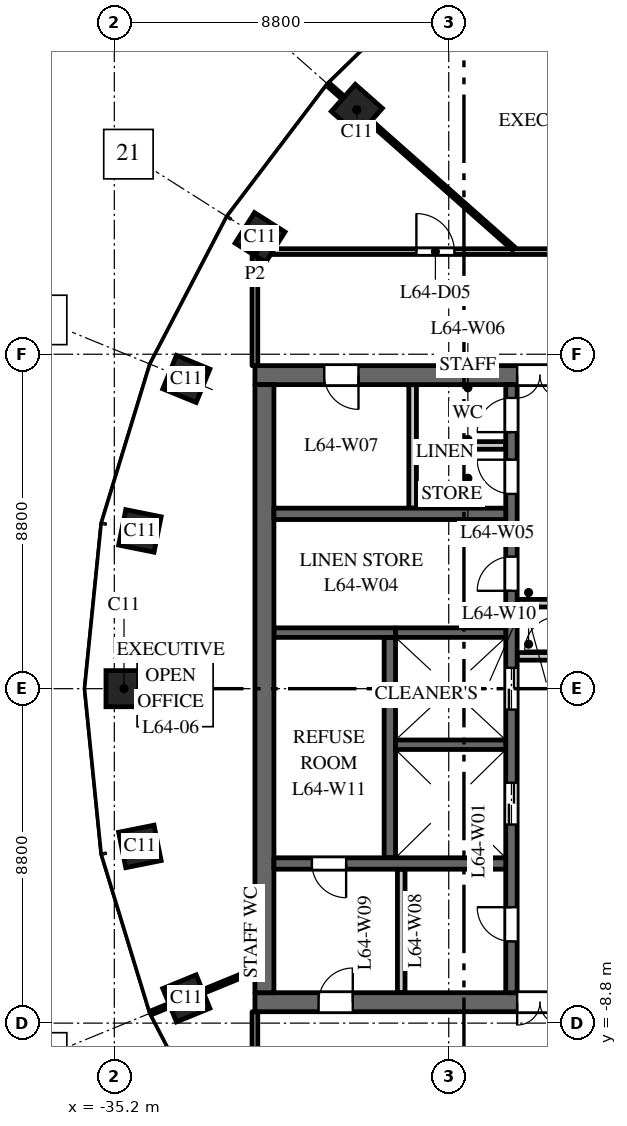
"""IFC4 building model, lengths in metres.
Left out: names, types, materials, properties, quantities, classifications, styles, units other than length and angle.
Written with IfcOpenShell. Run it as: python <this file> out.ifc"""

import sys

from ifc_helpers import new_model, si_unit, direction, frame, frame_2d, origin, origin_2d, place, context, subcontext, project, spatial, rectangle, extrude, element, fill, save


model = new_model("IFC4")
c1 = context("Model", 3, precision=1e-05, world=origin(), true_north=direction((0.0, 1.0)))
c2 = subcontext(c1, "Body", "Model", "MODEL_VIEW")
j1 = project(units=[si_unit("LENGTHUNIT", "METRE"), si_unit("PLANEANGLEUNIT", "RADIAN")], contexts=[c1])
p1 = place(None, origin())
s1 = spatial("IfcSite", under=j1, at=p1, CompositionType="ELEMENT")
p2 = place(p1, origin())
s2 = spatial("IfcBuilding", under=s1, at=p2, CompositionType="ELEMENT")
p3 = place(p2, frame((0.0, 0.0, 299.0)))
s3 = spatial("IfcBuildingStorey", under=s2, at=p3, CompositionType="ELEMENT", Elevation=299.0)
for number, where, z_axis, x_axis in (
    (1, (-28.819, 15.23, 0.0), (0.0, 0.0, 1.0), (-0.663, -0.749, 0.0)),
    (2, (-31.365, 11.871, 0.0), (0.0, 0.0, 1.0), (-0.535, -0.845, 0.0)),
    (3, (-33.305, 8.149, 0.0), (0.0, 0.0, 1.0), (-0.379, -0.925, 0.0)),
    (4, (-34.527, 4.151, 0.0), (0.0, 0.0, 1.0), (-0.197, -0.98, 0.0)),
    (5, (-34.945, 0.0, 0.0), (0.0, 0.0, 1.0), (0.0, -1.0, 0.0)),
    (6, (-34.527, -4.151, 0.0), (0.0, 0.0, 1.0), (0.197, -0.98, 0.0)),
    (7, (-33.305, -8.149, 0.0), (0.0, 0.0, 1.0), (0.379, -0.925, 0.0)),
):
    element("IfcColumn", number, at=place(p3, frame(where, z_axis=z_axis, x_axis=x_axis)), inside=s3, PredefinedType="COLUMN", context=c2, shape_type="SweptSolid", body=[
        extrude(rectangle(XDim=0.95, YDim=0.95, at=origin_2d()), origin(), (0.0, 0.0, 1.0), 4.0),
    ])
p4 = place(p3, frame((-16.5, 8.25, 0.0), z_axis=(0.0, 0.0, 1.0), x_axis=(-1.0, 0.0, 0.0)))
e8 = element("IfcWall", 8, at=p4, inside=s3, PredefinedType="SHEAR", context=c2, shape_type="SweptSolid", body=[
    extrude(rectangle(XDim=15.0, YDim=0.5, at=frame_2d((7.5, 0.0))), origin(), (0.0, 0.0, 1.0), 3.7),
])
p5 = place(p4, frame((6.9, 0.0, 0.0)))
e9 = element("IfcOpeningElement", 9, at=p5, cuts=e8, PredefinedType="OPENING", context=c2, shape_type="SweptSolid", body=[
    extrude(rectangle(XDim=1.2, YDim=2.1, at=frame_2d((0.6, 1.05))), frame((0.0, 0.26, 0.0), z_axis=(0.0, -1.0, 0.0), x_axis=(1.0, 0.0, 0.0)), (0.0, 0.0, 1.0), 0.52),
])
p6 = place(p4, frame((12.275, 0.0, 0.0)))
e10 = element("IfcOpeningElement", 10, at=p6, cuts=e8, PredefinedType="OPENING", context=c2, shape_type="SweptSolid", body=[
    extrude(rectangle(XDim=0.9, YDim=2.1, at=frame_2d((0.45, 1.05))), frame((0.0, 0.26, 0.0), z_axis=(0.0, -1.0, 0.0), x_axis=(1.0, 0.0, 0.0)), (0.0, 0.0, 1.0), 0.52),
])
p7 = place(p3, frame((-16.5, -8.25, 0.0), z_axis=(0.0, 0.0, 1.0), x_axis=(-1.0, 0.0, 0.0)))
e11 = element("IfcWall", 11, at=p7, inside=s3, PredefinedType="SHEAR", context=c2, shape_type="SweptSolid", body=[
    extrude(rectangle(XDim=15.0, YDim=0.5, at=frame_2d((7.5, 0.0))), origin(), (0.0, 0.0, 1.0), 3.7),
])
p8 = place(p7, frame((6.9, 0.0, 0.0)))
e12 = element("IfcOpeningElement", 12, at=p8, cuts=e11, PredefinedType="OPENING", context=c2, shape_type="SweptSolid", body=[
    extrude(rectangle(XDim=1.2, YDim=2.1, at=frame_2d((0.6, 1.05))), frame((0.0, 0.26, 0.0), z_axis=(0.0, -1.0, 0.0), x_axis=(1.0, 0.0, 0.0)), (0.0, 0.0, 1.0), 0.52),
])
p9 = place(p7, frame((12.425, 0.0, 0.0)))
e13 = element("IfcOpeningElement", 13, at=p9, cuts=e11, PredefinedType="OPENING", context=c2, shape_type="SweptSolid", body=[
    extrude(rectangle(XDim=0.9, YDim=2.1, at=frame_2d((0.45, 1.05))), frame((0.0, 0.26, 0.0), z_axis=(0.0, -1.0, 0.0), x_axis=(1.0, 0.0, 0.0)), (0.0, 0.0, 1.0), 0.52),
])
p10 = place(p3, frame((-27.95, -4.45, 0.0), z_axis=(0.0, 0.0, 1.0), x_axis=(0.0, 1.0, 0.0)))
e14 = element("IfcWall", 14, at=p10, inside=s3, PredefinedType="SHEAR", context=c2, shape_type="SweptSolid", body=[
    extrude(rectangle(XDim=5.8, YDim=0.3, at=frame_2d((2.9, 0.0))), origin(), (0.0, 0.0, 1.0), 3.7),
])
p11 = place(p3, frame((-27.8, 1.475, 0.0), z_axis=(0.0, 0.0, 1.0), x_axis=(-1.0, 0.0, 0.0)))
e15 = element("IfcWall", 15, at=p11, inside=s3, PredefinedType="SHEAR", context=c2, shape_type="SweptSolid", body=[
    extrude(rectangle(XDim=3.2, YDim=0.25, at=frame_2d((1.6, 0.0))), origin(), (0.0, 0.0, 1.0), 3.7),
])
p12 = place(p3, frame((-24.75, -8.0, 0.0), z_axis=(0.0, 0.0, 1.0), x_axis=(0.0, 1.0, 0.0)))
e16 = element("IfcWall", 16, at=p12, inside=s3, PredefinedType="SHEAR", context=c2, shape_type="SweptSolid", body=[
    extrude(rectangle(XDim=16.0, YDim=0.3, at=frame_2d((8.0, 0.0))), origin(), (0.0, 0.0, 1.0), 3.7),
])
p13 = place(p12, frame((4.425, 0.0, 0.0)))
e17 = element("IfcOpeningElement", 17, at=p13, cuts=e16, PredefinedType="OPENING", context=c2, shape_type="SweptSolid", body=[
    extrude(rectangle(XDim=1.1, YDim=2.1, at=frame_2d((0.55, 1.05))), frame((0.0, 0.16, 0.0), z_axis=(0.0, -1.0, 0.0), x_axis=(1.0, 0.0, 0.0)), (0.0, 0.0, 1.0), 0.32),
])
p14 = place(p12, frame((7.45, 0.0, 0.0)))
e18 = element("IfcOpeningElement", 18, at=p14, cuts=e16, PredefinedType="OPENING", context=c2, shape_type="SweptSolid", body=[
    extrude(rectangle(XDim=1.1, YDim=2.1, at=frame_2d((0.55, 1.05))), frame((0.0, 0.16, 0.0), z_axis=(0.0, -1.0, 0.0), x_axis=(1.0, 0.0, 0.0)), (0.0, 0.0, 1.0), 0.32),
])
p15 = place(p12, frame((10.575, 0.0, 0.0)))
e19 = element("IfcOpeningElement", 19, at=p15, cuts=e16, PredefinedType="OPENING", context=c2, shape_type="SweptSolid", body=[
    extrude(rectangle(XDim=0.9, YDim=2.1, at=frame_2d((0.45, 1.05))), frame((0.0, 0.16, 0.0), z_axis=(0.0, -1.0, 0.0), x_axis=(1.0, 0.0, 0.0)), (0.0, 0.0, 1.0), 0.32),
])
p16 = place(p12, frame((13.125, 0.0, 0.0)))
e20 = element("IfcOpeningElement", 20, at=p16, cuts=e16, PredefinedType="OPENING", context=c2, shape_type="SweptSolid", body=[
    extrude(rectangle(XDim=0.9, YDim=2.1, at=frame_2d((0.45, 1.05))), frame((0.0, 0.16, 0.0), z_axis=(0.0, -1.0, 0.0), x_axis=(1.0, 0.0, 0.0)), (0.0, 0.0, 1.0), 0.32),
])
p17 = place(p12, frame((14.75, 0.0, 0.0)))
e21 = element("IfcOpeningElement", 21, at=p17, cuts=e16, PredefinedType="OPENING", context=c2, shape_type="SweptSolid", body=[
    extrude(rectangle(XDim=0.9, YDim=2.1, at=frame_2d((0.45, 1.05))), frame((0.0, 0.16, 0.0), z_axis=(0.0, -1.0, 0.0), x_axis=(1.0, 0.0, 0.0)), (0.0, 0.0, 1.0), 0.32),
])
p18 = place(p12, frame((1.35, 0.0, 0.0)))
e22 = element("IfcOpeningElement", 22, at=p18, cuts=e16, PredefinedType="OPENING", context=c2, shape_type="SweptSolid", body=[
    extrude(rectangle(XDim=0.9, YDim=2.1, at=frame_2d((0.45, 1.05))), frame((0.0, 0.16, 0.0), z_axis=(0.0, -1.0, 0.0), x_axis=(1.0, 0.0, 0.0)), (0.0, 0.0, 1.0), 0.32),
])
for number, where, z_axis, x_axis in (
    (23, (-23.4, 0.85, 0.0), (0.0, 0.0, 1.0), (-1.0, 0.0, 0.0)),
    (24, (-23.4, 2.25, 0.0), (0.0, 0.0, 1.0), (-1.0, 0.0, 0.0)),
):
    element("IfcWall", number, at=place(p3, frame(where, z_axis=z_axis, x_axis=x_axis)), inside=s3, PredefinedType="PARTITIONING", context=c2, shape_type="SweptSolid", body=[
        extrude(rectangle(XDim=1.2, YDim=0.2, at=frame_2d((0.6, 0.0))), origin(), (0.0, 0.0, 1.0), 3.7),
    ])
p19 = place(p3, frame((-31.25, -8.0, 0.0), z_axis=(0.0, 0.0, 1.0), x_axis=(0.0, 1.0, 0.0)))
e25 = element("IfcWall", 25, at=p19, inside=s3, PredefinedType="SHEAR", context=c2, shape_type="SweptSolid", body=[
    extrude(rectangle(XDim=16.0, YDim=0.5, at=frame_2d((8.0, 0.0))), origin(), (0.0, 0.0, 1.0), 3.7),
])
p20 = place(p3, frame((-24.9, 4.6, 0.0), z_axis=(0.0, 0.0, 1.0), x_axis=(-1.0, 0.0, 0.0)))
e26 = element("IfcWall", 26, at=p20, inside=s3, PredefinedType="SHEAR", context=c2, shape_type="SweptSolid", body=[
    extrude(rectangle(XDim=6.1, YDim=0.3, at=frame_2d((3.05, 0.0))), origin(), (0.0, 0.0, 1.0), 3.7),
])
for number, where, z_axis, x_axis in (
    (27, (-27.35, 4.75, 0.0), (0.0, 0.0, 1.0), (0.0, 1.0, 0.0)),
    (28, (-27.65, -8.0, 0.0), (0.0, 0.0, 1.0), (0.0, 1.0, 0.0)),
):
    element("IfcWall", number, at=place(p3, frame(where, z_axis=z_axis, x_axis=x_axis)), inside=s3, PredefinedType="PARTITIONING", context=c2, shape_type="SweptSolid", body=[
        extrude(rectangle(XDim=3.25, YDim=0.2, at=frame_2d((1.625, 0.0))), origin(), (0.0, 0.0, 1.0), 3.7),
    ])
p21 = place(p3, frame((-24.9, 6.4, 0.0), z_axis=(0.0, 0.0, 1.0), x_axis=(-1.0, 0.0, 0.0)))
e29 = element("IfcWall", 29, at=p21, inside=s3, PredefinedType="PARTITIONING", context=c2, shape_type="SweptSolid", body=[
    extrude(rectangle(XDim=2.35, YDim=0.2, at=frame_2d((1.175, 0.0))), origin(), (0.0, 0.0, 1.0), 3.7),
])
p22 = place(p3, frame((-24.9, -4.6, 0.0), z_axis=(0.0, 0.0, 1.0), x_axis=(-1.0, 0.0, 0.0)))
e30 = element("IfcWall", 30, at=p22, inside=s3, PredefinedType="SHEAR", context=c2, shape_type="SweptSolid", body=[
    extrude(rectangle(XDim=6.1, YDim=0.3, at=frame_2d((3.05, 0.0))), origin(), (0.0, 0.0, 1.0), 3.7),
])
p23 = place(p22, frame((4.2, 0.0, 0.0)))
e31 = element("IfcOpeningElement", 31, at=p23, cuts=e30, PredefinedType="OPENING", context=c2, shape_type="SweptSolid", body=[
    extrude(rectangle(XDim=0.9, YDim=2.1, at=frame_2d((0.45, 1.05))), frame((0.0, 0.16, 0.0), z_axis=(0.0, -1.0, 0.0), x_axis=(1.0, 0.0, 0.0)), (0.0, 0.0, 1.0), 0.32),
])
for number, where, z_axis, x_axis in (
    (32, (-24.9, -1.475, 0.0), (0.0, 0.0, 1.0), (-1.0, 0.0, 0.0)),
    (33, (-24.9, 1.475, 0.0), (0.0, 0.0, 1.0), (-1.0, 0.0, 0.0)),
):
    element("IfcWall", number, at=place(p3, frame(where, z_axis=z_axis, x_axis=x_axis)), inside=s3, PredefinedType="SHEAR", context=c2, shape_type="SweptSolid", body=[
        extrude(rectangle(XDim=2.9, YDim=0.25, at=frame_2d((1.45, 0.0))), origin(), (0.0, 0.0, 1.0), 3.7),
    ])
p24 = place(p3, frame((-34.234, -8.53, 0.0), z_axis=(0.0, 0.0, 1.0), x_axis=(0.925344112436, 0.379128307542, 0.0)))
e34 = element("IfcWall", 34, at=p24, inside=s3, PredefinedType="PARTITIONING", context=c2, shape_type="SweptSolid", body=[
    extrude(rectangle(XDim=2.954, YDim=0.1, at=frame_2d((1.477, 0.0))), origin(), (0.0, 0.0, 1.0), 3.0),
])
for number, where, z_axis, x_axis in (
    (35, (-31.5, -11.5, 0.0), (0.0, 0.0, 1.0), (0.0, 1.0, 0.0)),
    (36, (-31.5, 8.5, 0.0), (0.0, 0.0, 1.0), (0.0, 1.0, 0.0)),
):
    element("IfcWall", number, at=place(p3, frame(where, z_axis=z_axis, x_axis=x_axis)), inside=s3, PredefinedType="PARTITIONING", context=c2, shape_type="SweptSolid", body=[
        extrude(rectangle(XDim=3.0, YDim=0.15, at=frame_2d((1.5, 0.0))), origin(), (0.0, 0.0, 1.0), 3.0),
    ])
p25 = place(p3, frame((-31.5, 11.5, 0.0), z_axis=(0.0, 0.0, 1.0), x_axis=(1.0, 0.0, 0.0)))
e37 = element("IfcWall", 37, at=p25, inside=s3, PredefinedType="PARTITIONING", context=c2, shape_type="SweptSolid", body=[
    extrude(rectangle(XDim=29.768, YDim=0.15, at=frame_2d((14.884, 0.0))), origin(), (0.0, 0.0, 1.0), 2.75),
])
p26 = place(p25, frame((4.249, 0.0, 0.0)))
e38 = element("IfcOpeningElement", 38, at=p26, cuts=e37, PredefinedType="OPENING", context=c2, shape_type="SweptSolid", body=[
    extrude(rectangle(XDim=1.0, YDim=2.1, at=frame_2d((0.5, 1.05))), frame((0.0, 0.085, 0.0), z_axis=(0.0, -1.0, 0.0), x_axis=(1.0, 0.0, 0.0)), (0.0, 0.0, 1.0), 0.17),
])
p27 = place(p25, frame((16.471, 0.0, 0.0)))
e39 = element("IfcOpeningElement", 39, at=p27, cuts=e37, PredefinedType="OPENING", context=c2, shape_type="SweptSolid", body=[
    extrude(rectangle(XDim=1.0, YDim=2.1, at=frame_2d((0.5, 1.05))), frame((0.0, 0.085, 0.0), z_axis=(0.0, -1.0, 0.0), x_axis=(1.0, 0.0, 0.0)), (0.0, 0.0, 1.0), 0.17),
])
p28 = place(p25, frame((28.076, 0.0, 0.0)))
e40 = element("IfcOpeningElement", 40, at=p28, cuts=e37, PredefinedType="OPENING", context=c2, shape_type="SweptSolid", body=[
    extrude(rectangle(XDim=1.0, YDim=2.1, at=frame_2d((0.5, 1.05))), frame((0.0, 0.085, 0.0), z_axis=(0.0, -1.0, 0.0), x_axis=(1.0, 0.0, 0.0)), (0.0, 0.0, 1.0), 0.17),
])
p29 = place(p25, frame((19.062, 0.0, 0.0)))
e41 = element("IfcOpeningElement", 41, at=p29, cuts=e37, PredefinedType="OPENING", context=c2, shape_type="SweptSolid", body=[
    extrude(rectangle(XDim=1.0, YDim=2.1, at=frame_2d((0.5, 1.05))), frame((0.0, 0.085, 0.0), z_axis=(0.0, -1.0, 0.0), x_axis=(1.0, 0.0, 0.0)), (0.0, 0.0, 1.0), 0.17),
])
p30 = place(p3, frame((-29.569, 15.895, 0.0), z_axis=(0.0, 0.0, 1.0), x_axis=(0.748988695283, -0.662582775461, 0.0)))
e42 = element("IfcWall", 42, at=p30, inside=s3, PredefinedType="PARTITIONING", context=c2, shape_type="SweptSolid", body=[
    extrude(rectangle(XDim=6.516, YDim=0.1, at=frame_2d((3.258, 0.0))), origin(), (0.0, 0.0, 1.0), 3.0),
])
p31 = place(p13, origin())
e43 = element("IfcDoor", 43, at=p31, inside=s3, OperationType="DOUBLE_DOOR_SLIDING", PredefinedType="DOOR", context=c2, shape_type="SweptSolid", body=[
    extrude(rectangle(XDim=1.1, YDim=2.1, at=frame_2d((0.55, 1.05))), frame((0.0, 0.025, 0.0), z_axis=(0.0, -1.0, 0.0), x_axis=(1.0, 0.0, 0.0)), (0.0, 0.0, 1.0), 0.05),
])
fill(e17, e43)
p32 = place(p14, origin())
e44 = element("IfcDoor", 44, at=p32, inside=s3, OperationType="DOUBLE_DOOR_SLIDING", PredefinedType="DOOR", context=c2, shape_type="SweptSolid", body=[
    extrude(rectangle(XDim=1.1, YDim=2.1, at=frame_2d((0.55, 1.05))), frame((0.0, 0.025, 0.0), z_axis=(0.0, -1.0, 0.0), x_axis=(1.0, 0.0, 0.0)), (0.0, 0.0, 1.0), 0.05),
])
fill(e18, e44)
p33 = place(p5, origin())
e45 = element("IfcDoor", 45, at=p33, inside=s3, OperationType="DOUBLE_DOOR_DOUBLE_SWING", PredefinedType="DOOR", context=c2, shape_type="SweptSolid", body=[
    extrude(rectangle(XDim=1.2, YDim=2.1, at=frame_2d((0.6, 1.05))), frame((0.0, 0.025, 0.0), z_axis=(0.0, -1.0, 0.0), x_axis=(1.0, 0.0, 0.0)), (0.0, 0.0, 1.0), 0.05),
])
fill(e9, e45)
p34 = place(p8, origin())
e46 = element("IfcDoor", 46, at=p34, inside=s3, OperationType="DOUBLE_DOOR_DOUBLE_SWING", PredefinedType="DOOR", context=c2, shape_type="SweptSolid", body=[
    extrude(rectangle(XDim=1.2, YDim=2.1, at=frame_2d((0.6, 1.05))), frame((0.0, 0.025, 0.0), z_axis=(0.0, -1.0, 0.0), x_axis=(1.0, 0.0, 0.0)), (0.0, 0.0, 1.0), 0.05),
])
fill(e12, e46)
p35 = place(p15, origin())
e47 = element("IfcDoor", 47, at=p35, inside=s3, OperationType="SINGLE_SWING_RIGHT", PredefinedType="DOOR", context=c2, shape_type="SweptSolid", body=[
    extrude(rectangle(XDim=0.9, YDim=2.1, at=frame_2d((0.45, 1.05))), frame((0.0, 0.025, 0.0), z_axis=(0.0, -1.0, 0.0), x_axis=(1.0, 0.0, 0.0)), (0.0, 0.0, 1.0), 0.05),
])
fill(e19, e47)
p36 = place(p16, origin())
e48 = element("IfcDoor", 48, at=p36, inside=s3, OperationType="SINGLE_SWING_LEFT", PredefinedType="DOOR", context=c2, shape_type="SweptSolid", body=[
    extrude(rectangle(XDim=0.9, YDim=2.1, at=frame_2d((0.45, 1.05))), frame((0.0, 0.025, 0.0), z_axis=(0.0, -1.0, 0.0), x_axis=(1.0, 0.0, 0.0)), (0.0, 0.0, 1.0), 0.05),
])
fill(e20, e48)
p37 = place(p17, origin())
e49 = element("IfcDoor", 49, at=p37, inside=s3, OperationType="SINGLE_SWING_RIGHT", PredefinedType="DOOR", context=c2, shape_type="SweptSolid", body=[
    extrude(rectangle(XDim=0.9, YDim=2.1, at=frame_2d((0.45, 1.05))), frame((0.0, 0.025, 0.0), z_axis=(0.0, -1.0, 0.0), x_axis=(1.0, 0.0, 0.0)), (0.0, 0.0, 1.0), 0.05),
])
fill(e21, e49)
p38 = place(p6, origin())
e50 = element("IfcDoor", 50, at=p38, inside=s3, OperationType="SINGLE_SWING_RIGHT", PredefinedType="DOOR", context=c2, shape_type="SweptSolid", body=[
    extrude(rectangle(XDim=0.9, YDim=2.1, at=frame_2d((0.45, 1.05))), frame((0.0, 0.025, 0.0), z_axis=(0.0, -1.0, 0.0), x_axis=(1.0, 0.0, 0.0)), (0.0, 0.0, 1.0), 0.05),
])
fill(e10, e50)
p39 = place(p18, origin())
e51 = element("IfcDoor", 51, at=p39, inside=s3, OperationType="SINGLE_SWING_LEFT", PredefinedType="DOOR", context=c2, shape_type="SweptSolid", body=[
    extrude(rectangle(XDim=0.9, YDim=2.1, at=frame_2d((0.45, 1.05))), frame((0.0, 0.025, 0.0), z_axis=(0.0, -1.0, 0.0), x_axis=(1.0, 0.0, 0.0)), (0.0, 0.0, 1.0), 0.05),
])
fill(e22, e51)
p40 = place(p9, origin())
e52 = element("IfcDoor", 52, at=p40, inside=s3, OperationType="SINGLE_SWING_LEFT", PredefinedType="DOOR", context=c2, shape_type="SweptSolid", body=[
    extrude(rectangle(XDim=0.9, YDim=2.1, at=frame_2d((0.45, 1.05))), frame((0.0, 0.025, 0.0), z_axis=(0.0, -1.0, 0.0), x_axis=(1.0, 0.0, 0.0)), (0.0, 0.0, 1.0), 0.05),
])
fill(e13, e52)
p41 = place(p23, origin())
e53 = element("IfcDoor", 53, at=p41, inside=s3, OperationType="SINGLE_SWING_RIGHT", PredefinedType="DOOR", context=c2, shape_type="SweptSolid", body=[
    extrude(rectangle(XDim=0.9, YDim=2.1, at=frame_2d((0.45, 1.05))), frame((0.0, 0.025, 0.0), z_axis=(0.0, -1.0, 0.0), x_axis=(1.0, 0.0, 0.0)), (0.0, 0.0, 1.0), 0.05),
])
fill(e31, e53)
p42 = place(p26, origin())
e54 = element("IfcDoor", 54, at=p42, inside=s3, OperationType="SINGLE_SWING_LEFT", PredefinedType="DOOR", context=c2, shape_type="SweptSolid", body=[
    extrude(rectangle(XDim=1.0, YDim=2.1, at=frame_2d((0.5, 1.05))), frame((0.0, 0.025, 0.0), z_axis=(0.0, -1.0, 0.0), x_axis=(1.0, 0.0, 0.0)), (0.0, 0.0, 1.0), 0.05),
])
fill(e38, e54)
save(model, sys.argv[1])
